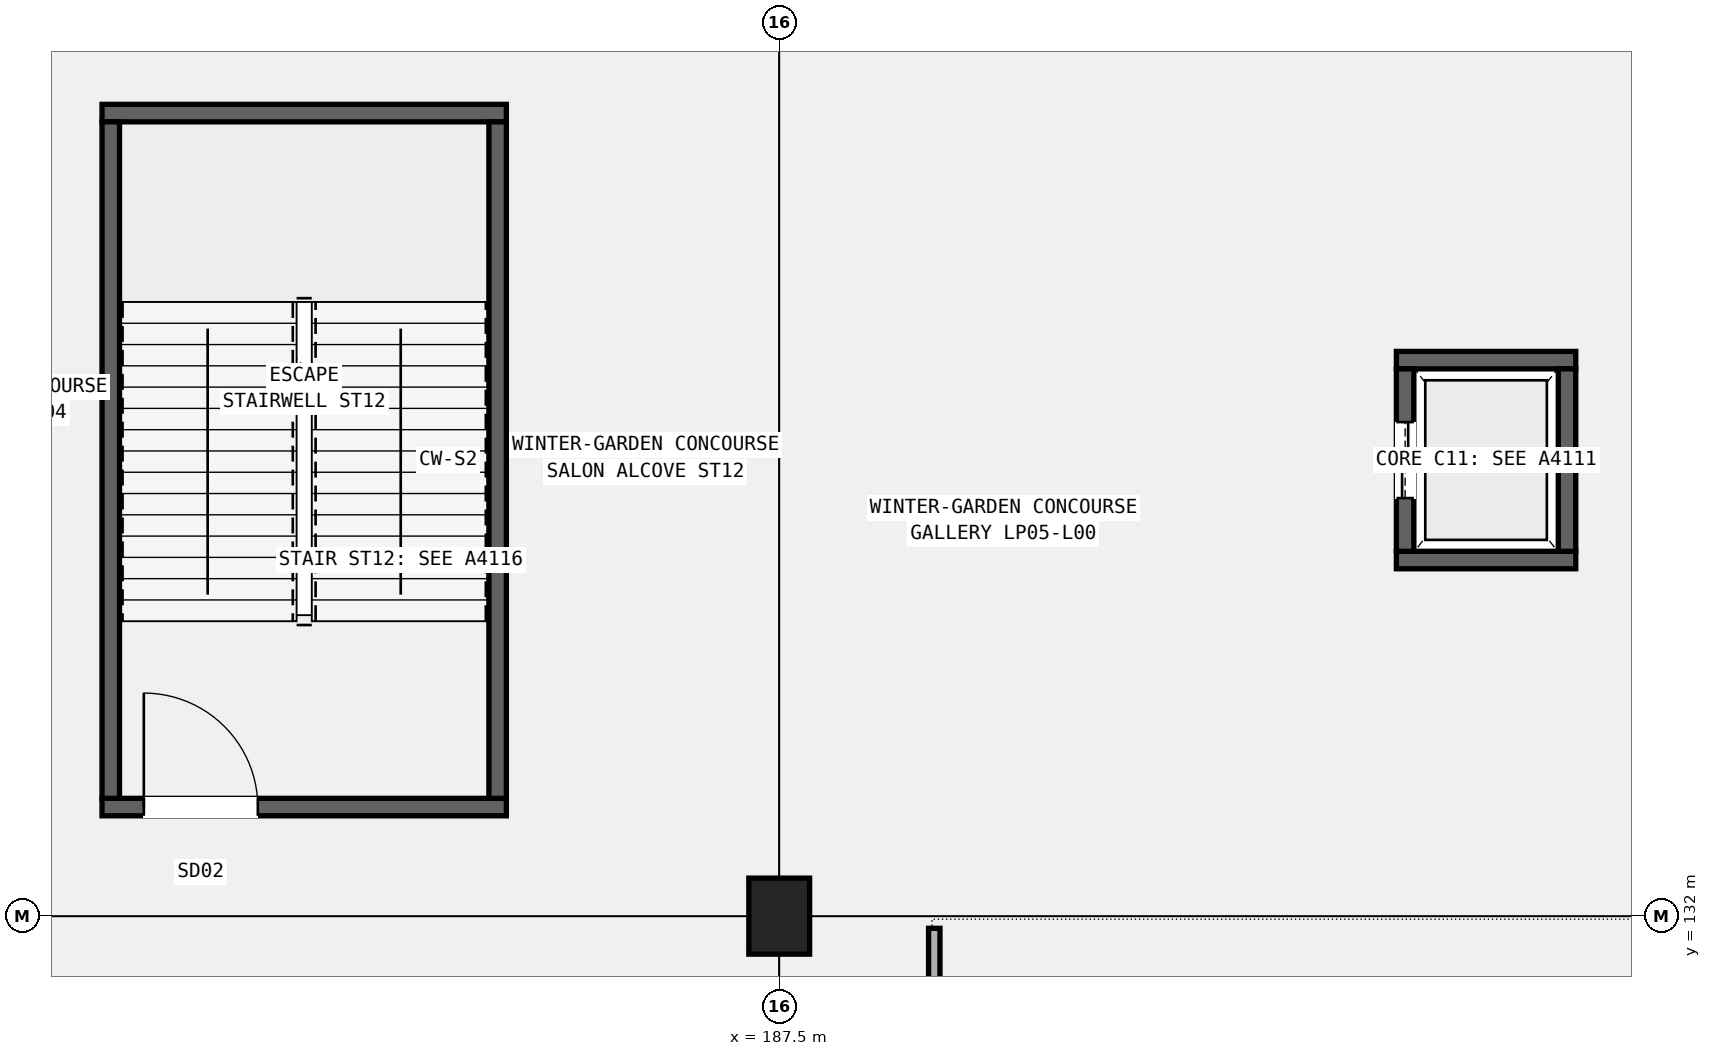
"""IFC4 building model, lengths in metres.
Left out: names, types, materials, properties, quantities, classifications, styles, units other than length and angle.
Written with IfcOpenShell. Run it as: python <this file> out.ifc"""

import sys

from ifc_helpers import new_model, si_unit, direction, frame, frame_2d, origin, origin_2d, place, context, subcontext, project, spatial, rectangle, extrude, element, fill, save


model = new_model("IFC4")
c1 = context("Model", 3, precision=1e-05, world=origin(), true_north=direction((0.0, 1.0)))
c2 = subcontext(c1, "Body", "Model", "MODEL_VIEW")
j1 = project(units=[si_unit("LENGTHUNIT", "METRE"), si_unit("PLANEANGLEUNIT", "RADIAN")], contexts=[c1])
p1 = place(None, origin())
s1 = spatial("IfcSite", under=j1, at=p1, CompositionType="ELEMENT")
p2 = place(p1, origin())
s2 = spatial("IfcBuilding", under=s1, at=p2, CompositionType="ELEMENT")
p3 = place(p2, origin())
s3 = spatial("IfcBuildingStorey", under=s2, at=p3, CompositionType="ELEMENT", Elevation=0.0)
p4 = place(p3, frame((187.5, 132.0, 0.0), z_axis=(0.0, 0.0, 1.0), x_axis=(1.0, 0.0, 0.0)))
e1 = element("IfcColumn", 1, at=p4, inside=s3, PredefinedType="COLUMN", context=c2, shape_type="SweptSolid", body=[
    extrude(rectangle(XDim=0.8, YDim=1.0, at=origin_2d()), origin(), (0.0, 0.0, 1.0), 5.4),
])
p5 = place(p3, frame((178.59, 133.435, 0.0), z_axis=(0.0, 0.0, 1.0), x_axis=(1.0, 0.0, 0.0)))
e2 = element("IfcWall", 2, at=p5, inside=s3, PredefinedType="SHEAR", context=c2, shape_type="SweptSolid", body=[
    extrude(rectangle(XDim=5.32, YDim=0.23, at=frame_2d((2.66, 0.0))), origin(), (0.0, 0.0, 1.0), 5.14),
])
p6 = place(p5, frame((0.55, 0.0, 0.0)))
e3 = element("IfcOpeningElement", 3, at=p6, cuts=e2, PredefinedType="OPENING", context=c2, shape_type="SweptSolid", body=[
    extrude(rectangle(XDim=1.5, YDim=2.2, at=frame_2d((0.75, 1.1))), frame((0.0, 0.125, 0.0), z_axis=(0.0, -1.0, 0.0), x_axis=(1.0, 0.0, 0.0)), (0.0, 0.0, 1.0), 0.25),
])
p7 = place(p3, frame((178.59, 142.565, 0.0), z_axis=(0.0, 0.0, 1.0), x_axis=(1.0, 0.0, 0.0)))
e4 = element("IfcWall", 4, at=p7, inside=s3, PredefinedType="SHEAR", context=c2, shape_type="SweptSolid", body=[
    extrude(rectangle(XDim=5.32, YDim=0.23, at=frame_2d((2.66, 0.0))), origin(), (0.0, 0.0, 1.0), 5.14),
])
for number, where, z_axis, x_axis in (
    (5, (178.705, 133.55, 0.0), (0.0, 0.0, 1.0), (0.0, 1.0, 0.0)),
    (6, (183.795, 133.55, 0.0), (0.0, 0.0, 1.0), (0.0, 1.0, 0.0)),
):
    element("IfcWall", number, at=place(p3, frame(where, z_axis=z_axis, x_axis=x_axis)), inside=s3, PredefinedType="SHEAR", context=c2, shape_type="SweptSolid", body=[
        extrude(rectangle(XDim=8.9, YDim=0.23, at=frame_2d((4.45, 0.0))), origin(), (0.0, 0.0, 1.0), 5.14),
    ])
for number, where, z_axis, x_axis in (
    (7, (195.62, 136.685, 0.0), (0.0, 0.0, 1.0), (1.0, 0.0, 0.0)),
    (8, (195.62, 139.315, 0.0), (0.0, 0.0, 1.0), (1.0, 0.0, 0.0)),
):
    element("IfcWall", number, at=place(p3, frame(where, z_axis=z_axis, x_axis=x_axis)), inside=s3, PredefinedType="SHEAR", context=c2, shape_type="SweptSolid", body=[
        extrude(rectangle(XDim=2.36, YDim=0.23, at=frame_2d((1.18, 0.0))), origin(), (0.0, 0.0, 1.0), 5.14),
    ])
p8 = place(p3, frame((195.735, 136.8, 0.0), z_axis=(0.0, 0.0, 1.0), x_axis=(0.0, 1.0, 0.0)))
e9 = element("IfcWall", 9, at=p8, inside=s3, PredefinedType="SHEAR", context=c2, shape_type="SweptSolid", body=[
    extrude(rectangle(XDim=2.4, YDim=0.23, at=frame_2d((1.2, 0.0))), origin(), (0.0, 0.0, 1.0), 5.14),
])
p9 = place(p8, frame((0.7, 0.0, 0.0)))
e10 = element("IfcOpeningElement", 10, at=p9, cuts=e9, PredefinedType="OPENING", context=c2, shape_type="SweptSolid", body=[
    extrude(rectangle(XDim=1.0, YDim=2.15, at=frame_2d((0.5, 1.075))), frame((0.0, 0.125, 0.0), z_axis=(0.0, -1.0, 0.0), x_axis=(1.0, 0.0, 0.0)), (0.0, 0.0, 1.0), 0.25),
])
p10 = place(p3, frame((197.865, 136.8, 0.0), z_axis=(0.0, 0.0, 1.0), x_axis=(0.0, 1.0, 0.0)))
e11 = element("IfcWall", 11, at=p10, inside=s3, PredefinedType="SHEAR", context=c2, shape_type="SweptSolid", body=[
    extrude(rectangle(XDim=2.4, YDim=0.23, at=frame_2d((1.2, 0.0))), origin(), (0.0, 0.0, 1.0), 5.14),
])
p11 = place(p3, frame((189.54, 120.16, 0.0), z_axis=(0.0, 0.0, 1.0), x_axis=(0.0, 1.0, 0.0)))
e12 = element("IfcWall", 12, at=p11, inside=s3, PredefinedType="PARTITIONING", context=c2, shape_type="SweptSolid", body=[
    extrude(rectangle(XDim=11.68, YDim=0.15, at=frame_2d((5.84, 0.0))), origin(), (0.0, 0.0, 1.0), 4.52),
])
p12 = place(p11, frame((6.64, 0.0, 0.0), z_axis=(0.0, 0.0, 1.0), x_axis=(-1.0, 0.0, 0.0)))
e13 = element("IfcOpeningElement", 13, at=p12, cuts=e12, PredefinedType="OPENING", context=c2, shape_type="SweptSolid", body=[
    extrude(rectangle(XDim=1.6, YDim=2.3, at=frame_2d((0.8, 1.15))), frame((0.0, 0.085, 0.0), z_axis=(0.0, -1.0, 0.0), x_axis=(1.0, 0.0, 0.0)), (0.0, 0.0, 1.0), 0.17),
])
p13 = place(p6, origin())
e14 = element("IfcDoor", 14, at=p13, inside=s3, OperationType="SINGLE_SWING_LEFT", PredefinedType="DOOR", context=c2, shape_type="SweptSolid", body=[
    extrude(rectangle(XDim=1.5, YDim=2.2, at=frame_2d((0.75, 1.1))), frame((0.0, 0.025, 0.0), z_axis=(0.0, -1.0, 0.0), x_axis=(1.0, 0.0, 0.0)), (0.0, 0.0, 1.0), 0.05),
])
fill(e3, e14)
p14 = place(p9, origin())
e15 = element("IfcDoor", 15, at=p14, inside=s3, OperationType="DOUBLE_DOOR_SLIDING", PredefinedType="DOOR", context=c2, shape_type="SweptSolid", body=[
    extrude(rectangle(XDim=1.0, YDim=2.15, at=frame_2d((0.5, 1.075))), frame((0.0, 0.025, 0.0), z_axis=(0.0, -1.0, 0.0), x_axis=(1.0, 0.0, 0.0)), (0.0, 0.0, 1.0), 0.05),
])
fill(e10, e15)
save(model, sys.argv[1])
